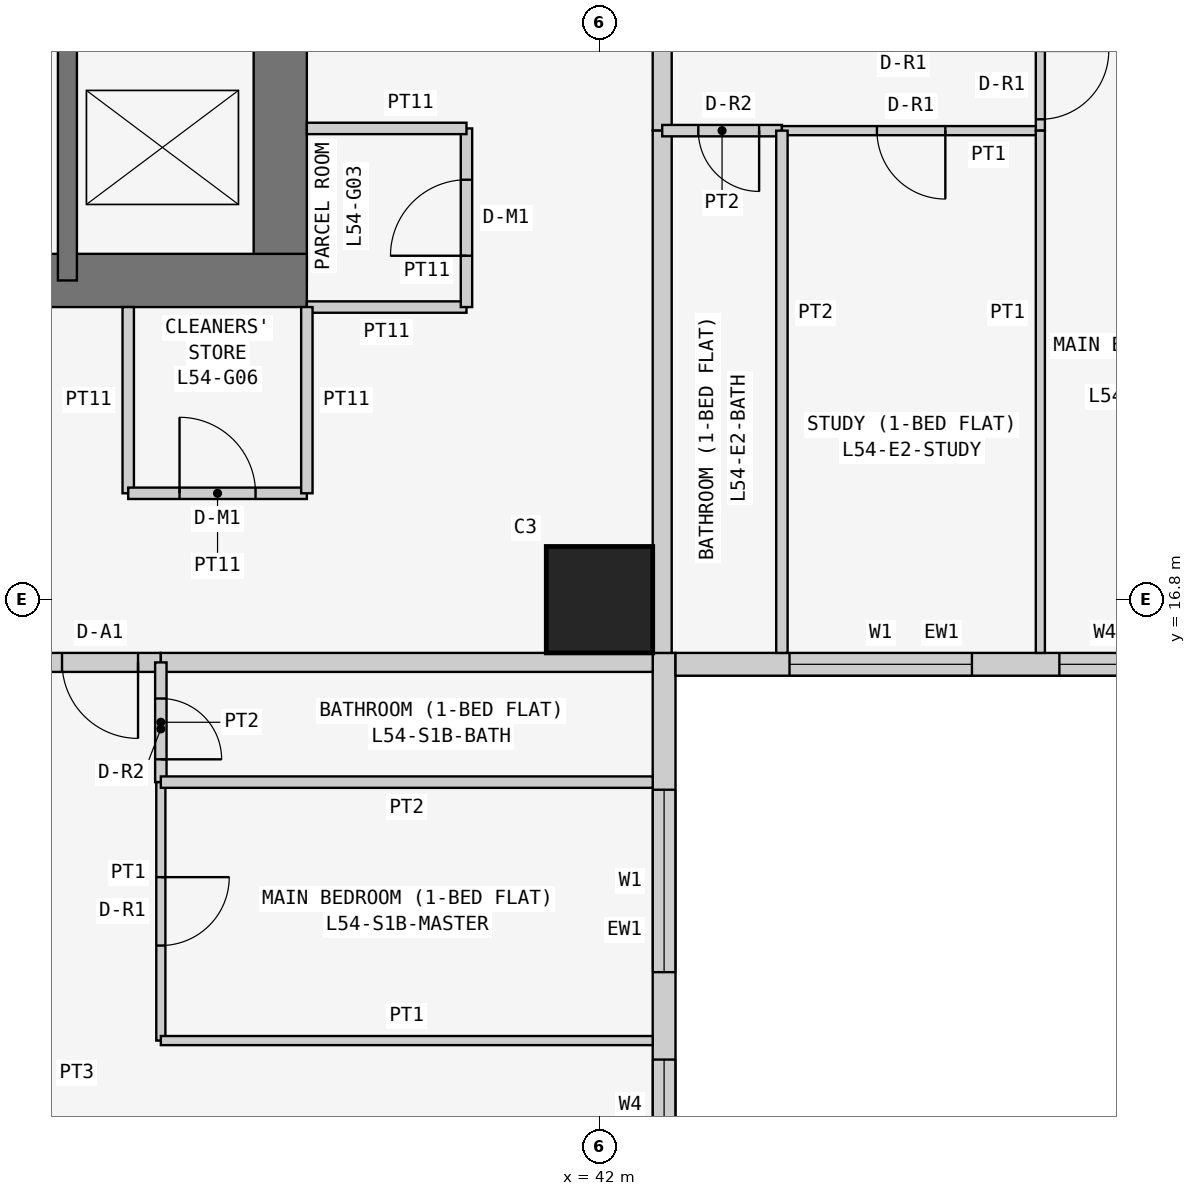
"""IFC4 building model, lengths in metres.
Left out: names, types, materials, properties, quantities, classifications, styles, units other than length and angle.
Written with IfcOpenShell. Run it as: python <this file> out.ifc"""

import sys

from ifc_helpers import new_model, si_unit, direction, frame, frame_2d, origin, origin_2d, place, context, subcontext, project, spatial, rectangle, extrude, element, fill, save


model = new_model("IFC4")
c1 = context("Model", 3, precision=1e-05, world=origin(), true_north=direction((0.0, 1.0)))
c2 = subcontext(c1, "Body", "Model", "MODEL_VIEW")
j1 = project(units=[si_unit("LENGTHUNIT", "METRE"), si_unit("PLANEANGLEUNIT", "RADIAN")], contexts=[c1])
p1 = place(None, origin())
s1 = spatial("IfcSite", under=j1, at=p1, CompositionType="ELEMENT")
p2 = place(p1, origin())
s2 = spatial("IfcBuilding", under=s1, at=p2, CompositionType="ELEMENT")
p3 = place(p2, frame((0.0, 0.0, 208.5)))
s3 = spatial("IfcBuildingStorey", under=s2, at=p3, CompositionType="ELEMENT", Elevation=208.5)
p4 = place(p3, frame((42.0, 16.8, 0.0), z_axis=(0.0, 0.0, 1.0), x_axis=(1.0, 0.0, 0.0)))
e1 = element("IfcColumn", 1, at=p4, inside=s3, PredefinedType="COLUMN", context=c2, shape_type="SweptSolid", body=[
    extrude(rectangle(XDim=1.4, YDim=1.4, at=origin_2d()), origin(), (0.0, 0.0, 1.0), 3.6),
])
p5 = place(p3, frame((21.0, 21.0, 0.0), z_axis=(0.0, 0.0, 1.0), x_axis=(1.0, 0.0, 0.0)))
e2 = element("IfcWall", 2, at=p5, inside=s3, PredefinedType="SHEAR", context=c2, shape_type="SweptSolid", body=[
    extrude(rectangle(XDim=17.15, YDim=0.7, at=frame_2d((8.575, 0.0))), origin(), (0.0, 0.0, 1.0), 3.6),
])
p6 = place(p3, frame((37.8, 21.0, 0.0), z_axis=(0.0, 0.0, 1.0), x_axis=(0.0, 1.0, 0.0)))
e3 = element("IfcWall", 3, at=p6, inside=s3, PredefinedType="SHEAR", context=c2, shape_type="SweptSolid", body=[
    extrude(rectangle(XDim=17.15, YDim=0.7, at=frame_2d((8.575, 0.0))), origin(), (0.0, 0.0, 1.0), 3.6),
])
p7 = place(p6, frame((5.2, 0.0, 0.0)))
e4 = element("IfcOpeningElement", 4, at=p7, cuts=e3, PredefinedType="OPENING", context=c2, shape_type="SweptSolid", body=[
    extrude(rectangle(XDim=1.2, YDim=2.1, at=frame_2d((0.6, 1.05))), frame((0.0, 0.36, 0.0), z_axis=(0.0, -1.0, 0.0), x_axis=(1.0, 0.0, 0.0)), (0.0, 0.0, 1.0), 0.72),
])
p8 = place(p3, frame((35.0, 21.0, 0.0), z_axis=(0.0, 0.0, 1.0), x_axis=(0.0, 1.0, 0.0)))
e5 = element("IfcWall", 5, at=p8, inside=s3, PredefinedType="SHEAR", context=c2, shape_type="SweptSolid", body=[
    extrude(rectangle(XDim=3.2, YDim=0.25, at=frame_2d((1.6, 0.0))), origin(), (0.0, 0.0, 1.0), 3.6),
])
p9 = place(p3, frame((42.85, 8.8, 0.0), z_axis=(0.0, 0.0, 1.0), x_axis=(0.0, 1.0, 0.0)))
e6 = element("IfcWall", 6, at=p9, inside=s3, PredefinedType="SOLIDWALL", context=c2, shape_type="SweptSolid", body=[
    extrude(rectangle(XDim=7.3, YDim=0.3, at=frame_2d((3.65, 0.0))), origin(), (0.0, 0.0, 1.0), 3.45),
])
p10 = place(p9, frame((3.1, 0.0, 0.9)))
e7 = element("IfcOpeningElement", 7, at=p10, cuts=e6, PredefinedType="OPENING", context=c2, shape_type="SweptSolid", body=[
    extrude(rectangle(XDim=2.4, YDim=1.5, at=frame_2d((1.2, 0.75))), frame((0.0, 0.16, 0.0), z_axis=(0.0, -1.0, 0.0), x_axis=(1.0, 0.0, 0.0)), (0.0, 0.0, 1.0), 0.32),
])
p11 = place(p9, frame((0.75, 0.0, 0.9)))
e8 = element("IfcOpeningElement", 8, at=p11, cuts=e6, PredefinedType="OPENING", context=c2, shape_type="SweptSolid", body=[
    extrude(rectangle(XDim=1.2, YDim=1.5, at=frame_2d((0.6, 0.75))), frame((0.0, 0.16, 0.0), z_axis=(0.0, -1.0, 0.0), x_axis=(1.0, 0.0, 0.0)), (0.0, 0.0, 1.0), 0.32),
])
p12 = place(p3, frame((43.0, 15.95, 0.0), z_axis=(0.0, 0.0, 1.0), x_axis=(1.0, 0.0, 0.0)))
e9 = element("IfcWall", 9, at=p12, inside=s3, PredefinedType="SOLIDWALL", context=c2, shape_type="SweptSolid", body=[
    extrude(rectangle(XDim=7.0, YDim=0.3, at=frame_2d((3.5, 0.0))), origin(), (0.0, 0.0, 1.0), 3.45),
])
p13 = place(p12, frame((1.5, 0.0, 0.9)))
e10 = element("IfcOpeningElement", 10, at=p13, cuts=e9, PredefinedType="OPENING", context=c2, shape_type="SweptSolid", body=[
    extrude(rectangle(XDim=2.4, YDim=1.5, at=frame_2d((1.2, 0.75))), frame((0.0, 0.16, 0.0), z_axis=(0.0, -1.0, 0.0), x_axis=(1.0, 0.0, 0.0)), (0.0, 0.0, 1.0), 0.32),
])
p14 = place(p12, frame((5.05, 0.0, 0.9)))
e11 = element("IfcOpeningElement", 11, at=p14, cuts=e9, PredefinedType="OPENING", context=c2, shape_type="SweptSolid", body=[
    extrude(rectangle(XDim=1.2, YDim=1.5, at=frame_2d((0.6, 0.75))), frame((0.0, 0.16, 0.0), z_axis=(0.0, -1.0, 0.0), x_axis=(1.0, 0.0, 0.0)), (0.0, 0.0, 1.0), 0.32),
])
p15 = place(p3, frame((38.15, 20.65, 0.0), z_axis=(0.0, 0.0, 1.0), x_axis=(1.0, 0.0, 0.0)))
e12 = element("IfcWall", 12, at=p15, inside=s3, PredefinedType="PARTITIONING", context=c2, shape_type="SweptSolid", body=[
    extrude(rectangle(XDim=2.1, YDim=0.15, at=frame_2d((1.05, 0.0))), origin(), (0.0, 0.0, 1.0), 3.45),
])
p16 = place(p3, frame((40.25, 20.65, 0.0), z_axis=(0.0, 0.0, 1.0), x_axis=(0.0, 1.0, 0.0)))
e13 = element("IfcWall", 13, at=p16, inside=s3, PredefinedType="PARTITIONING", context=c2, shape_type="SweptSolid", body=[
    extrude(rectangle(XDim=2.35, YDim=0.15, at=frame_2d((1.175, 0.0))), origin(), (0.0, 0.0, 1.0), 3.45),
])
p17 = place(p16, frame((0.675, 0.0, 0.0)))
e14 = element("IfcOpeningElement", 14, at=p17, cuts=e13, PredefinedType="OPENING", context=c2, shape_type="SweptSolid", body=[
    extrude(rectangle(XDim=1.0, YDim=2.1, at=frame_2d((0.5, 1.05))), frame((0.0, 0.085, 0.0), z_axis=(0.0, -1.0, 0.0), x_axis=(1.0, 0.0, 0.0)), (0.0, 0.0, 1.0), 0.17),
])
p18 = place(p3, frame((40.25, 23.0, 0.0), z_axis=(0.0, 0.0, 1.0), x_axis=(-1.0, 0.0, 0.0)))
e15 = element("IfcWall", 15, at=p18, inside=s3, PredefinedType="PARTITIONING", context=c2, shape_type="SweptSolid", body=[
    extrude(rectangle(XDim=2.1, YDim=0.15, at=frame_2d((1.05, 0.0))), origin(), (0.0, 0.0, 1.0), 3.45),
])
p19 = place(p3, frame((35.8, 20.65, 0.0), z_axis=(0.0, 0.0, 1.0), x_axis=(0.0, -1.0, 0.0)))
e16 = element("IfcWall", 16, at=p19, inside=s3, PredefinedType="PARTITIONING", context=c2, shape_type="SweptSolid", body=[
    extrude(rectangle(XDim=2.45, YDim=0.15, at=frame_2d((1.225, 0.0))), origin(), (0.0, 0.0, 1.0), 3.45),
])
p20 = place(p3, frame((35.8, 18.2, 0.0), z_axis=(0.0, 0.0, 1.0), x_axis=(1.0, 0.0, 0.0)))
e17 = element("IfcWall", 17, at=p20, inside=s3, PredefinedType="PARTITIONING", context=c2, shape_type="SweptSolid", body=[
    extrude(rectangle(XDim=2.35, YDim=0.15, at=frame_2d((1.175, 0.0))), origin(), (0.0, 0.0, 1.0), 3.45),
])
p21 = place(p20, frame((0.675, 0.0, 0.0)))
e18 = element("IfcOpeningElement", 18, at=p21, cuts=e17, PredefinedType="OPENING", context=c2, shape_type="SweptSolid", body=[
    extrude(rectangle(XDim=1.0, YDim=2.1, at=frame_2d((0.5, 1.05))), frame((0.0, 0.085, 0.0), z_axis=(0.0, -1.0, 0.0), x_axis=(1.0, 0.0, 0.0)), (0.0, 0.0, 1.0), 0.17),
])
p22 = place(p3, frame((38.15, 18.2, 0.0), z_axis=(0.0, 0.0, 1.0), x_axis=(0.0, 1.0, 0.0)))
e19 = element("IfcWall", 19, at=p22, inside=s3, PredefinedType="PARTITIONING", context=c2, shape_type="SweptSolid", body=[
    extrude(rectangle(XDim=2.45, YDim=0.15, at=frame_2d((1.225, 0.0))), origin(), (0.0, 0.0, 1.0), 3.45),
])
p23 = place(p3, frame((42.825, 29.4, 0.0), z_axis=(0.0, 0.0, 1.0), x_axis=(0.0, -1.0, 0.0)))
e20 = element("IfcWall", 20, at=p23, inside=s3, PredefinedType="PARTITIONING", context=c2, shape_type="SweptSolid", body=[
    extrude(rectangle(XDim=6.429, YDim=0.25, at=frame_2d((3.214, 0.0))), origin(), (0.0, 0.0, 1.0), 3.45),
])
p24 = place(p23, frame((0.5, 0.0, 0.0)))
e21 = element("IfcOpeningElement", 21, at=p24, cuts=e20, PredefinedType="OPENING", context=c2, shape_type="SweptSolid", body=[
    extrude(rectangle(XDim=1.0, YDim=2.1, at=frame_2d((0.5, 1.05))), frame((0.0, 0.135, 0.0), z_axis=(0.0, -1.0, 0.0), x_axis=(1.0, 0.0, 0.0)), (0.0, 0.0, 1.0), 0.27),
])
p25 = place(p3, frame((42.825, 22.971, 0.0), z_axis=(0.0, 0.0, 1.0), x_axis=(0.0, -1.0, 0.0)))
e22 = element("IfcWall", 22, at=p25, inside=s3, PredefinedType="PARTITIONING", context=c2, shape_type="SweptSolid", body=[
    extrude(rectangle(XDim=6.871, YDim=0.25, at=frame_2d((3.436, 0.0))), origin(), (0.0, 0.0, 1.0), 3.45),
])
p26 = place(p3, frame((36.229, 15.975, 0.0), z_axis=(0.0, 0.0, 1.0), x_axis=(-1.0, 0.0, 0.0)))
e23 = element("IfcWall", 23, at=p26, inside=s3, PredefinedType="PARTITIONING", context=c2, shape_type="SweptSolid", body=[
    extrude(rectangle(XDim=1.6, YDim=0.25, at=frame_2d((0.8, 0.0))), origin(), (0.0, 0.0, 1.0), 3.45),
])
p27 = place(p26, frame((0.3, 0.0, 0.0)))
e24 = element("IfcOpeningElement", 24, at=p27, cuts=e23, PredefinedType="OPENING", context=c2, shape_type="SweptSolid", body=[
    extrude(rectangle(XDim=1.0, YDim=2.1, at=frame_2d((0.5, 1.05))), frame((0.0, 0.135, 0.0), z_axis=(0.0, -1.0, 0.0), x_axis=(1.0, 0.0, 0.0)), (0.0, 0.0, 1.0), 0.27),
])
p28 = place(p3, frame((42.7, 15.975, 0.0), z_axis=(0.0, 0.0, 1.0), x_axis=(-1.0, 0.0, 0.0)))
e25 = element("IfcWall", 25, at=p28, inside=s3, PredefinedType="PARTITIONING", context=c2, shape_type="SweptSolid", body=[
    extrude(rectangle(XDim=6.471, YDim=0.25, at=frame_2d((3.235, 0.0))), origin(), (0.0, 0.0, 1.0), 3.45),
])
p29 = place(p3, frame((44.4, 22.971, 0.0), z_axis=(0.0, 0.0, 1.0), x_axis=(-1.0, 0.0, 0.0)))
e26 = element("IfcWall", 26, at=p29, inside=s3, PredefinedType="PARTITIONING", context=c2, shape_type="SweptSolid", body=[
    extrude(rectangle(XDim=1.575, YDim=0.15, at=frame_2d((0.788, 0.0))), origin(), (0.0, 0.0, 1.0), 3.45),
])
p30 = place(p29, frame((0.3, 0.0, 0.0)))
e27 = element("IfcOpeningElement", 27, at=p30, cuts=e26, PredefinedType="OPENING", context=c2, shape_type="SweptSolid", body=[
    extrude(rectangle(XDim=0.8, YDim=2.1, at=frame_2d((0.4, 1.05))), frame((0.0, 0.085, 0.0), z_axis=(0.0, -1.0, 0.0), x_axis=(1.0, 0.0, 0.0)), (0.0, 0.0, 1.0), 0.17),
])
p31 = place(p3, frame((47.8, 22.971, 0.0), z_axis=(0.0, 0.0, 1.0), x_axis=(-1.0, 0.0, 0.0)))
e28 = element("IfcWall", 28, at=p31, inside=s3, PredefinedType="PARTITIONING", context=c2, shape_type="SweptSolid", body=[
    extrude(rectangle(XDim=3.4, YDim=0.12, at=frame_2d((1.7, 0.0))), origin(), (0.0, 0.0, 1.0), 3.45),
])
p32 = place(p31, frame((1.25, 0.0, 0.0)))
e29 = element("IfcOpeningElement", 29, at=p32, cuts=e28, PredefinedType="OPENING", context=c2, shape_type="SweptSolid", body=[
    extrude(rectangle(XDim=0.9, YDim=2.1, at=frame_2d((0.45, 1.05))), frame((0.0, 0.07, 0.0), z_axis=(0.0, -1.0, 0.0), x_axis=(1.0, 0.0, 0.0)), (0.0, 0.0, 1.0), 0.14),
])
p33 = place(p3, frame((47.8, 24.171, 0.0), z_axis=(0.0, 0.0, 1.0), x_axis=(0.0, -1.0, 0.0)))
e30 = element("IfcWall", 30, at=p33, inside=s3, PredefinedType="PARTITIONING", context=c2, shape_type="SweptSolid", body=[
    extrude(rectangle(XDim=1.2, YDim=0.12, at=frame_2d((0.6, 0.0))), origin(), (0.0, 0.0, 1.0), 3.45),
])
p34 = place(p33, frame((0.151, 0.0, 0.0)))
e31 = element("IfcOpeningElement", 31, at=p34, cuts=e30, PredefinedType="OPENING", context=c2, shape_type="SweptSolid", body=[
    extrude(rectangle(XDim=0.9, YDim=2.1, at=frame_2d((0.45, 1.05))), frame((0.0, 0.07, 0.0), z_axis=(0.0, -1.0, 0.0), x_axis=(1.0, 0.0, 0.0)), (0.0, 0.0, 1.0), 0.14),
])
p35 = place(p3, frame((44.4, 22.971, 0.0), z_axis=(0.0, 0.0, 1.0), x_axis=(0.0, -1.0, 0.0)))
e32 = element("IfcWall", 32, at=p35, inside=s3, PredefinedType="PARTITIONING", context=c2, shape_type="SweptSolid", body=[
    extrude(rectangle(XDim=6.871, YDim=0.15, at=frame_2d((3.436, 0.0))), origin(), (0.0, 0.0, 1.0), 3.45),
])
p36 = place(p3, frame((47.8, 22.971, 0.0), z_axis=(0.0, 0.0, 1.0), x_axis=(0.0, -1.0, 0.0)))
e33 = element("IfcWall", 33, at=p36, inside=s3, PredefinedType="PARTITIONING", context=c2, shape_type="SweptSolid", body=[
    extrude(rectangle(XDim=6.871, YDim=0.12, at=frame_2d((3.436, 0.0))), origin(), (0.0, 0.0, 1.0), 3.45),
])
p37 = place(p3, frame((36.229, 15.975, 0.0), z_axis=(0.0, 0.0, 1.0), x_axis=(0.0, -1.0, 0.0)))
e34 = element("IfcWall", 34, at=p37, inside=s3, PredefinedType="PARTITIONING", context=c2, shape_type="SweptSolid", body=[
    extrude(rectangle(XDim=1.575, YDim=0.15, at=frame_2d((0.788, 0.0))), origin(), (0.0, 0.0, 1.0), 3.45),
])
p38 = place(p37, frame((0.475, 0.0, 0.0)))
e35 = element("IfcOpeningElement", 35, at=p38, cuts=e34, PredefinedType="OPENING", context=c2, shape_type="SweptSolid", body=[
    extrude(rectangle(XDim=0.8, YDim=2.1, at=frame_2d((0.4, 1.05))), frame((0.0, 0.085, 0.0), z_axis=(0.0, -1.0, 0.0), x_axis=(1.0, 0.0, 0.0)), (0.0, 0.0, 1.0), 0.17),
])
p39 = place(p3, frame((36.229, 14.4, 0.0), z_axis=(0.0, 0.0, 1.0), x_axis=(0.0, -1.0, 0.0)))
e36 = element("IfcWall", 36, at=p39, inside=s3, PredefinedType="PARTITIONING", context=c2, shape_type="SweptSolid", body=[
    extrude(rectangle(XDim=3.4, YDim=0.12, at=frame_2d((1.7, 0.0))), origin(), (0.0, 0.0, 1.0), 3.45),
])
p40 = place(p39, frame((1.25, 0.0, 0.0)))
e37 = element("IfcOpeningElement", 37, at=p40, cuts=e36, PredefinedType="OPENING", context=c2, shape_type="SweptSolid", body=[
    extrude(rectangle(XDim=0.9, YDim=2.1, at=frame_2d((0.45, 1.05))), frame((0.0, 0.07, 0.0), z_axis=(0.0, -1.0, 0.0), x_axis=(1.0, 0.0, 0.0)), (0.0, 0.0, 1.0), 0.14),
])
p41 = place(p3, frame((36.229, 11.0, 0.0), z_axis=(0.0, 0.0, 1.0), x_axis=(1.0, 0.0, 0.0)))
e38 = element("IfcWall", 38, at=p41, inside=s3, PredefinedType="PARTITIONING", context=c2, shape_type="SweptSolid", body=[
    extrude(rectangle(XDim=6.471, YDim=0.12, at=frame_2d((3.235, 0.0))), origin(), (0.0, 0.0, 1.0), 3.45),
])
p42 = place(p3, frame((36.229, 14.4, 0.0), z_axis=(0.0, 0.0, 1.0), x_axis=(1.0, 0.0, 0.0)))
e39 = element("IfcWall", 39, at=p42, inside=s3, PredefinedType="PARTITIONING", context=c2, shape_type="SweptSolid", body=[
    extrude(rectangle(XDim=6.471, YDim=0.15, at=frame_2d((3.235, 0.0))), origin(), (0.0, 0.0, 1.0), 3.45),
])
p43 = place(p13, origin())
e40 = element("IfcWindow", 40, at=p43, inside=s3, PartitioningType="SINGLE_PANEL", PredefinedType="WINDOW", context=c2, shape_type="SweptSolid", body=[
    extrude(rectangle(XDim=2.4, YDim=1.5, at=frame_2d((1.2, 0.75))), frame((0.0, 0.03, 0.0), z_axis=(0.0, -1.0, 0.0), x_axis=(1.0, 0.0, 0.0)), (0.0, 0.0, 1.0), 0.06),
])
fill(e10, e40)
p44 = place(p14, origin())
e41 = element("IfcWindow", 41, at=p44, inside=s3, PartitioningType="SINGLE_PANEL", PredefinedType="WINDOW", context=c2, shape_type="SweptSolid", body=[
    extrude(rectangle(XDim=1.2, YDim=1.5, at=frame_2d((0.6, 0.75))), frame((0.0, 0.03, 0.0), z_axis=(0.0, -1.0, 0.0), x_axis=(1.0, 0.0, 0.0)), (0.0, 0.0, 1.0), 0.06),
])
fill(e11, e41)
p45 = place(p10, origin())
e42 = element("IfcWindow", 42, at=p45, inside=s3, PartitioningType="SINGLE_PANEL", PredefinedType="WINDOW", context=c2, shape_type="SweptSolid", body=[
    extrude(rectangle(XDim=2.4, YDim=1.5, at=frame_2d((1.2, 0.75))), frame((0.0, 0.03, 0.0), z_axis=(0.0, -1.0, 0.0), x_axis=(1.0, 0.0, 0.0)), (0.0, 0.0, 1.0), 0.06),
])
fill(e7, e42)
p46 = place(p11, origin())
e43 = element("IfcWindow", 43, at=p46, inside=s3, PartitioningType="SINGLE_PANEL", PredefinedType="WINDOW", context=c2, shape_type="SweptSolid", body=[
    extrude(rectangle(XDim=1.2, YDim=1.5, at=frame_2d((0.6, 0.75))), frame((0.0, 0.03, 0.0), z_axis=(0.0, -1.0, 0.0), x_axis=(1.0, 0.0, 0.0)), (0.0, 0.0, 1.0), 0.06),
])
fill(e8, e43)
p47 = place(p17, origin())
e44 = element("IfcDoor", 44, at=p47, inside=s3, OperationType="SINGLE_SWING_LEFT", PredefinedType="DOOR", context=c2, shape_type="SweptSolid", body=[
    extrude(rectangle(XDim=1.0, YDim=2.1, at=frame_2d((0.5, 1.05))), frame((0.0, 0.025, 0.0), z_axis=(0.0, -1.0, 0.0), x_axis=(1.0, 0.0, 0.0)), (0.0, 0.0, 1.0), 0.05),
])
fill(e14, e44)
p48 = place(p21, origin())
e45 = element("IfcDoor", 45, at=p48, inside=s3, OperationType="SINGLE_SWING_LEFT", PredefinedType="DOOR", context=c2, shape_type="SweptSolid", body=[
    extrude(rectangle(XDim=1.0, YDim=2.1, at=frame_2d((0.5, 1.05))), frame((0.0, 0.025, 0.0), z_axis=(0.0, -1.0, 0.0), x_axis=(1.0, 0.0, 0.0)), (0.0, 0.0, 1.0), 0.05),
])
fill(e18, e45)
p49 = place(p30, origin())
e46 = element("IfcDoor", 46, at=p49, inside=s3, OperationType="SINGLE_SWING_LEFT", PredefinedType="DOOR", context=c2, shape_type="SweptSolid", body=[
    extrude(rectangle(XDim=0.8, YDim=2.1, at=frame_2d((0.4, 1.05))), frame((0.0, 0.025, 0.0), z_axis=(0.0, -1.0, 0.0), x_axis=(1.0, 0.0, 0.0)), (0.0, 0.0, 1.0), 0.05),
])
fill(e27, e46)
p50 = place(p32, origin())
e47 = element("IfcDoor", 47, at=p50, inside=s3, OperationType="SINGLE_SWING_LEFT", PredefinedType="DOOR", context=c2, shape_type="SweptSolid", body=[
    extrude(rectangle(XDim=0.9, YDim=2.1, at=frame_2d((0.45, 1.05))), frame((0.0, 0.025, 0.0), z_axis=(0.0, -1.0, 0.0), x_axis=(1.0, 0.0, 0.0)), (0.0, 0.0, 1.0), 0.05),
])
fill(e29, e47)
p51 = place(p34, origin())
e48 = element("IfcDoor", 48, at=p51, inside=s3, OperationType="SINGLE_SWING_LEFT", PredefinedType="DOOR", context=c2, shape_type="SweptSolid", body=[
    extrude(rectangle(XDim=0.9, YDim=2.1, at=frame_2d((0.45, 1.05))), frame((0.0, 0.025, 0.0), z_axis=(0.0, -1.0, 0.0), x_axis=(1.0, 0.0, 0.0)), (0.0, 0.0, 1.0), 0.05),
])
fill(e31, e48)
p52 = place(p27, origin())
e49 = element("IfcDoor", 49, at=p52, inside=s3, OperationType="SINGLE_SWING_LEFT", PredefinedType="DOOR", context=c2, shape_type="SweptSolid", body=[
    extrude(rectangle(XDim=1.0, YDim=2.1, at=frame_2d((0.5, 1.05))), frame((0.0, 0.025, 0.0), z_axis=(0.0, -1.0, 0.0), x_axis=(1.0, 0.0, 0.0)), (0.0, 0.0, 1.0), 0.05),
])
fill(e24, e49)
p53 = place(p38, origin())
e50 = element("IfcDoor", 50, at=p53, inside=s3, OperationType="SINGLE_SWING_RIGHT", PredefinedType="DOOR", context=c2, shape_type="SweptSolid", body=[
    extrude(rectangle(XDim=0.8, YDim=2.1, at=frame_2d((0.4, 1.05))), frame((0.0, 0.025, 0.0), z_axis=(0.0, -1.0, 0.0), x_axis=(1.0, 0.0, 0.0)), (0.0, 0.0, 1.0), 0.05),
])
fill(e35, e50)
p54 = place(p40, origin())
e51 = element("IfcDoor", 51, at=p54, inside=s3, OperationType="SINGLE_SWING_LEFT", PredefinedType="DOOR", context=c2, shape_type="SweptSolid", body=[
    extrude(rectangle(XDim=0.9, YDim=2.1, at=frame_2d((0.45, 1.05))), frame((0.0, 0.025, 0.0), z_axis=(0.0, -1.0, 0.0), x_axis=(1.0, 0.0, 0.0)), (0.0, 0.0, 1.0), 0.05),
])
fill(e37, e51)
save(model, sys.argv[1])
